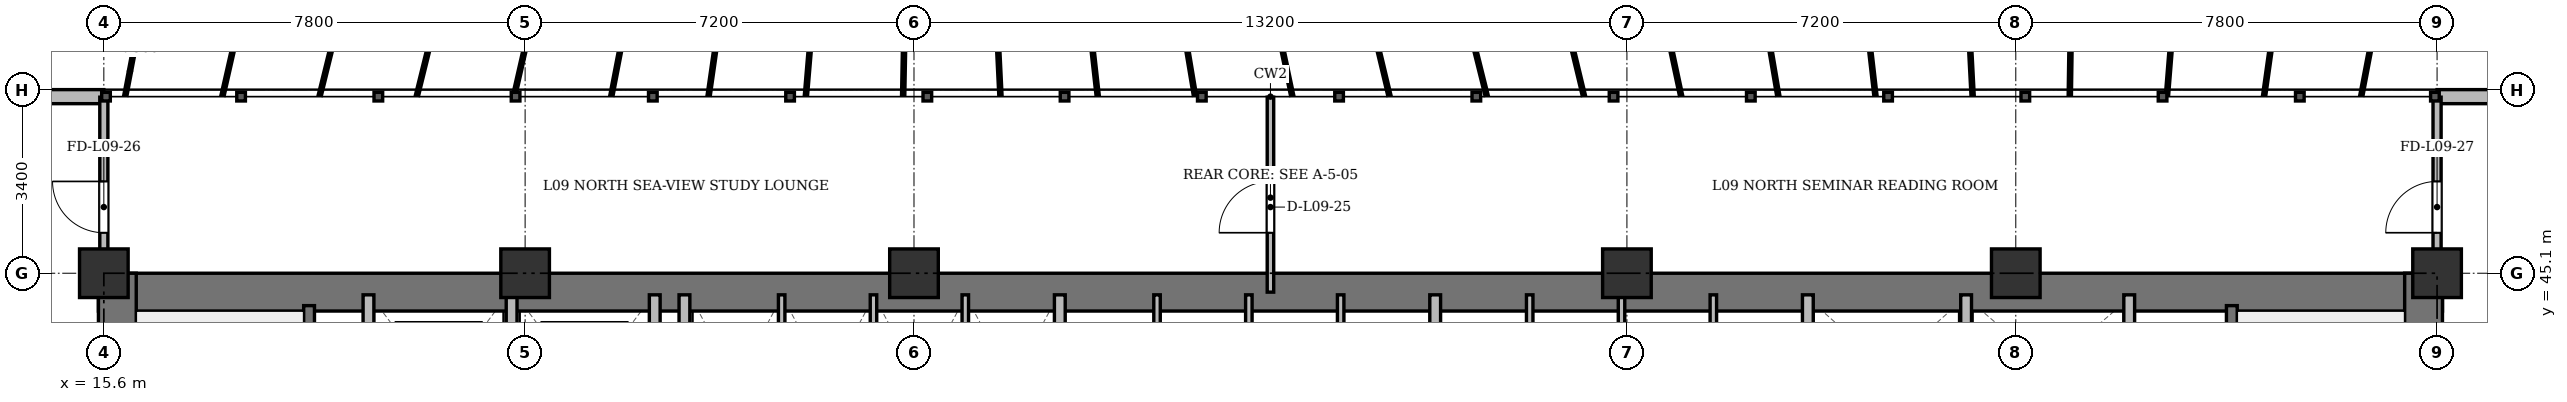
"""IFC4 building model, lengths in metres.
Left out: names, types, materials, properties, quantities, classifications, styles, units other than length and angle.
Written with IfcOpenShell. Run it as: python <this file> out.ifc"""

import sys

from ifc_helpers import new_model, si_unit, direction, frame, frame_2d, origin, origin_2d, place, context, subcontext, project, spatial, rectangle, extrude, source, transform, mapped, element, fill, save


model = new_model("IFC4")
c1 = context("Model", 3, precision=1e-05, world=origin(), true_north=direction((0.0, 1.0)))
c2 = subcontext(c1, "Body", "Model", "MODEL_VIEW")
j1 = project(units=[si_unit("LENGTHUNIT", "METRE"), si_unit("PLANEANGLEUNIT", "RADIAN")], contexts=[c1])
p1 = place(None, origin())
s1 = spatial("IfcSite", under=j1, at=p1, CompositionType="ELEMENT")
p2 = place(p1, origin())
s2 = spatial("IfcBuilding", under=s1, at=p2, CompositionType="ELEMENT")
p3 = place(p2, frame((0.0, 0.0, 37.9)))
s3 = spatial("IfcBuildingStorey", under=s2, at=p3, CompositionType="ELEMENT", Elevation=37.9)
m1 = source(origin(), c2, "Body", "SweptSolid", [
    extrude(rectangle(XDim=0.9, YDim=0.9, at=origin_2d()), origin(), (0.0, 0.0, 1.0), 3.6),
])
for number, where, z_axis, x_axis in (
    (1, (15.6, 45.1, 0.0), (0.0, 0.0, 1.0), (1.0, 0.0, 0.0)),
    (2, (23.4, 45.1, 0.0), (0.0, 0.0, 1.0), (1.0, 0.0, 0.0)),
    (3, (30.6, 45.1, 0.0), (0.0, 0.0, 1.0), (1.0, 0.0, 0.0)),
    (4, (43.8, 45.1, 0.0), (0.0, 0.0, 1.0), (1.0, 0.0, 0.0)),
    (5, (51.0, 45.1, 0.0), (0.0, 0.0, 1.0), (1.0, 0.0, 0.0)),
    (6, (58.8, 45.1, 0.0), (0.0, 0.0, 1.0), (1.0, 0.0, 0.0)),
):
    element("IfcColumn", number, at=place(p3, frame(where, z_axis=z_axis, x_axis=x_axis)), inside=s3, PredefinedType="COLUMN", context=c2, shape_type="MappedRepresentation", body=[
        mapped(m1, transform((0.0, 0.0, 0.0), x_axis=(1.0, 0.0, 0.0), y_axis=(0.0, 1.0, 0.0), z_axis=(0.0, 0.0, 1.0), scale=1.0)),
    ])
p4 = place(p3, frame((7.6, 48.37, 0.0), z_axis=(0.0, 0.0, 1.0), x_axis=(1.0, 0.0, 0.0)))
e7 = element("IfcWall", 7, at=p4, inside=s3, PredefinedType="SOLIDWALL", context=c2, shape_type="SweptSolid", body=[
    extrude(rectangle(XDim=8.0, YDim=0.26, at=frame_2d((4.0, 0.0))), origin(), (0.0, 0.0, 1.0), 3.34),
])
p5 = place(p4, frame((3.325, 0.0, 0.9)))
e8 = element("IfcOpeningElement", 8, at=p5, cuts=e7, PredefinedType="OPENING", context=c2, shape_type="SweptSolid", body=[
    extrude(rectangle(XDim=1.35, YDim=1.5, at=frame_2d((0.675, 0.75))), frame((0.0, 0.14, 0.0), z_axis=(0.0, -1.0, 0.0), x_axis=(1.0, 0.0, 0.0)), (0.0, 0.0, 1.0), 0.28),
])
p6 = place(p3, frame((58.8, 48.37, 0.0), z_axis=(0.0, 0.0, 1.0), x_axis=(1.0, 0.0, 0.0)))
e9 = element("IfcWall", 9, at=p6, inside=s3, PredefinedType="SOLIDWALL", context=c2, shape_type="SweptSolid", body=[
    extrude(rectangle(XDim=8.0, YDim=0.26, at=frame_2d((4.0, 0.0))), origin(), (0.0, 0.0, 1.0), 3.34),
])
p7 = place(p6, frame((3.325, 0.0, 0.9)))
e10 = element("IfcOpeningElement", 10, at=p7, cuts=e9, PredefinedType="OPENING", context=c2, shape_type="SweptSolid", body=[
    extrude(rectangle(XDim=1.35, YDim=1.5, at=frame_2d((0.675, 0.75))), frame((0.0, 0.14, 0.0), z_axis=(0.0, -1.0, 0.0), x_axis=(1.0, 0.0, 0.0)), (0.0, 0.0, 1.0), 0.28),
])
p8 = place(p3, frame((15.5, 44.75, 0.0), z_axis=(0.0, 0.0, 1.0), x_axis=(1.0, 0.0, 0.0)))
e11 = element("IfcWall", 11, at=p8, inside=s3, PredefinedType="SHEAR", context=c2, shape_type="SweptSolid", body=[
    extrude(rectangle(XDim=43.4, YDim=0.7, at=frame_2d((21.7, 0.0))), origin(), (0.0, 0.0, 1.0), 3.34),
])
for number, where, z_axis, x_axis in (
    (12, (15.85, 33.4, 0.0), (0.0, 0.0, 1.0), (0.0, 1.0, 0.0)),
    (13, (58.55, 33.4, 0.0), (0.0, 0.0, 1.0), (0.0, 1.0, 0.0)),
):
    element("IfcWall", number, at=place(p3, frame(where, z_axis=z_axis, x_axis=x_axis)), inside=s3, PredefinedType="SHEAR", context=c2, shape_type="SweptSolid", body=[
        extrude(rectangle(XDim=11.7, YDim=0.7, at=frame_2d((5.85, 0.0))), origin(), (0.0, 0.0, 1.0), 3.34),
    ])
p9 = place(p3, frame((19.4, 33.4, 0.0), z_axis=(0.0, 0.0, 1.0), x_axis=(0.0, 1.0, 0.0)))
e14 = element("IfcWall", 14, at=p9, inside=s3, PredefinedType="SHEAR", context=c2, shape_type="SweptSolid", body=[
    extrude(rectangle(XDim=11.1, YDim=0.2, at=frame_2d((5.55, 0.0))), origin(), (0.0, 0.0, 1.0), 3.34),
])
p10 = place(p9, frame((0.85, 0.0, 0.0)))
e15 = element("IfcOpeningElement", 15, at=p10, cuts=e14, PredefinedType="OPENING", context=c2, shape_type="SweptSolid", body=[
    extrude(rectangle(XDim=1.1, YDim=2.15, at=frame_2d((0.55, 1.075))), frame((0.0, 0.11, 0.0), z_axis=(0.0, -1.0, 0.0), x_axis=(1.0, 0.0, 0.0)), (0.0, 0.0, 1.0), 0.22),
])
p11 = place(p3, frame((55.0, 33.4, 0.0), z_axis=(0.0, 0.0, 1.0), x_axis=(0.0, 1.0, 0.0)))
e16 = element("IfcWall", 16, at=p11, inside=s3, PredefinedType="SHEAR", context=c2, shape_type="SweptSolid", body=[
    extrude(rectangle(XDim=11.1, YDim=0.2, at=frame_2d((5.55, 0.0))), origin(), (0.0, 0.0, 1.0), 3.34),
])
p12 = place(p11, frame((0.85, 0.0, 0.0)))
e17 = element("IfcOpeningElement", 17, at=p12, cuts=e16, PredefinedType="OPENING", context=c2, shape_type="SweptSolid", body=[
    extrude(rectangle(XDim=1.1, YDim=2.15, at=frame_2d((0.55, 1.075))), frame((0.0, 0.11, 0.0), z_axis=(0.0, -1.0, 0.0), x_axis=(1.0, 0.0, 0.0)), (0.0, 0.0, 1.0), 0.22),
])
for number, where, z_axis, x_axis in (
    (18, (20.5, 41.3, 0.0), (0.0, 0.0, 1.0), (0.0, 1.0, 0.0)),
    (19, (23.15, 41.3, 0.0), (0.0, 0.0, 1.0), (0.0, 1.0, 0.0)),
    (20, (25.8, 41.3, 0.0), (0.0, 0.0, 1.0), (0.0, 1.0, 0.0)),
):
    element("IfcWall", number, at=place(p3, frame(where, z_axis=z_axis, x_axis=x_axis)), inside=s3, PredefinedType="SOLIDWALL", context=c2, shape_type="SweptSolid", body=[
        extrude(rectangle(XDim=3.4, YDim=0.2, at=frame_2d((1.7, 0.0))), origin(), (0.0, 0.0, 1.0), 3.34),
    ])
p13 = place(p3, frame((26.35, 33.4, 0.0), z_axis=(0.0, 0.0, 1.0), x_axis=(0.0, 1.0, 0.0)))
e21 = element("IfcWall", 21, at=p13, inside=s3, PredefinedType="SOLIDWALL", context=c2, shape_type="SweptSolid", body=[
    extrude(rectangle(XDim=11.3, YDim=0.2, at=frame_2d((5.65, 0.0))), origin(), (0.0, 0.0, 1.0), 2.69),
])
p14 = place(p3, frame((33.3, 41.5, 0.0), z_axis=(0.0, 0.0, 1.0), x_axis=(0.0, 1.0, 0.0)))
e22 = element("IfcWall", 22, at=p14, inside=s3, PredefinedType="SOLIDWALL", context=c2, shape_type="SweptSolid", body=[
    extrude(rectangle(XDim=3.2, YDim=0.2, at=frame_2d((1.6, 0.0))), origin(), (0.0, 0.0, 1.0), 3.34),
])
for number, where, z_axis, x_axis in (
    (23, (28.15, 41.5, 0.0), (0.0, 0.0, 1.0), (0.0, 1.0, 0.0)),
    (24, (29.85, 41.5, 0.0), (0.0, 0.0, 1.0), (0.0, 1.0, 0.0)),
    (25, (31.55, 41.5, 0.0), (0.0, 0.0, 1.0), (0.0, 1.0, 0.0)),
    (26, (35.1, 41.5, 0.0), (0.0, 0.0, 1.0), (0.0, 1.0, 0.0)),
    (27, (36.8, 41.5, 0.0), (0.0, 0.0, 1.0), (0.0, 1.0, 0.0)),
    (28, (38.5, 41.5, 0.0), (0.0, 0.0, 1.0), (0.0, 1.0, 0.0)),
):
    element("IfcWall", number, at=place(p3, frame(where, z_axis=z_axis, x_axis=x_axis)), inside=s3, PredefinedType="PARTITIONING", context=c2, shape_type="SweptSolid", body=[
        extrude(rectangle(XDim=3.2, YDim=0.12, at=frame_2d((1.6, 0.0))), origin(), (0.0, 0.0, 1.0), 3.34),
    ])
p15 = place(p3, frame((40.25, 41.5, 0.0), z_axis=(0.0, 0.0, 1.0), x_axis=(0.0, 1.0, 0.0)))
e29 = element("IfcWall", 29, at=p15, inside=s3, PredefinedType="SOLIDWALL", context=c2, shape_type="SweptSolid", body=[
    extrude(rectangle(XDim=3.2, YDim=0.2, at=frame_2d((1.6, 0.0))), origin(), (0.0, 0.0, 1.0), 3.34),
])
p16 = place(p3, frame((42.0, 41.5, 0.0), z_axis=(0.0, 0.0, 1.0), x_axis=(0.0, 1.0, 0.0)))
e30 = element("IfcWall", 30, at=p16, inside=s3, PredefinedType="PARTITIONING", context=c2, shape_type="SweptSolid", body=[
    extrude(rectangle(XDim=3.2, YDim=0.12, at=frame_2d((1.6, 0.0))), origin(), (0.0, 0.0, 1.0), 3.34),
])
p17 = place(p3, frame((43.7, 41.5, 0.0), z_axis=(0.0, 0.0, 1.0), x_axis=(0.0, 1.0, 0.0)))
e31 = element("IfcWall", 31, at=p17, inside=s3, PredefinedType="PARTITIONING", context=c2, shape_type="SweptSolid", body=[
    extrude(rectangle(XDim=3.2, YDim=0.12, at=frame_2d((1.6, 0.0))), origin(), (0.0, 0.0, 1.0), 2.752),
])
p18 = place(p3, frame((45.4, 41.5, 0.0), z_axis=(0.0, 0.0, 1.0), x_axis=(0.0, 1.0, 0.0)))
e32 = element("IfcWall", 32, at=p18, inside=s3, PredefinedType="PARTITIONING", context=c2, shape_type="SweptSolid", body=[
    extrude(rectangle(XDim=3.2, YDim=0.12, at=frame_2d((1.6, 0.0))), origin(), (0.0, 0.0, 1.0), 3.34),
])
p19 = place(p3, frame((47.15, 33.4, 0.0), z_axis=(0.0, 0.0, 1.0), x_axis=(0.0, 1.0, 0.0)))
e33 = element("IfcWall", 33, at=p19, inside=s3, PredefinedType="SOLIDWALL", context=c2, shape_type="SweptSolid", body=[
    extrude(rectangle(XDim=11.3, YDim=0.2, at=frame_2d((5.65, 0.0))), origin(), (0.0, 0.0, 1.0), 2.69),
])
for number, where, z_axis, x_axis in (
    (34, (50.08, 42.05, 0.0), (0.0, 0.0, 1.0), (0.0, 1.0, 0.0)),
    (35, (53.1, 42.05, 0.0), (0.0, 0.0, 1.0), (0.0, 1.0, 0.0)),
):
    element("IfcWall", number, at=place(p3, frame(where, z_axis=z_axis, x_axis=x_axis)), inside=s3, PredefinedType="SOLIDWALL", context=c2, shape_type="SweptSolid", body=[
        extrude(rectangle(XDim=2.65, YDim=0.2, at=frame_2d((1.325, 0.0))), origin(), (0.0, 0.0, 1.0), 3.34),
    ])
p20 = place(p3, frame((37.2, 44.75, 0.0), z_axis=(0.0, 0.0, 1.0), x_axis=(0.0, 1.0, 0.0)))
e36 = element("IfcWall", 36, at=p20, inside=s3, PredefinedType="PARTITIONING", context=c2, shape_type="SweptSolid", body=[
    extrude(rectangle(XDim=3.61, YDim=0.12, at=frame_2d((1.805, 0.0))), origin(), (0.0, 0.0, 1.0), 2.69),
])
p21 = place(p20, frame((1.1, 0.0, 0.0)))
e37 = element("IfcOpeningElement", 37, at=p21, cuts=e36, PredefinedType="OPENING", context=c2, shape_type="SweptSolid", body=[
    extrude(rectangle(XDim=0.95, YDim=2.15, at=frame_2d((0.475, 1.075))), frame((0.0, 0.07, 0.0), z_axis=(0.0, -1.0, 0.0), x_axis=(1.0, 0.0, 0.0)), (0.0, 0.0, 1.0), 0.14),
])
p22 = place(p3, frame((15.6, 44.75, 0.0), z_axis=(0.0, 0.0, 1.0), x_axis=(0.0, 1.0, 0.0)))
e38 = element("IfcWall", 38, at=p22, inside=s3, PredefinedType="PARTITIONING", context=c2, shape_type="SweptSolid", body=[
    extrude(rectangle(XDim=3.61, YDim=0.15, at=frame_2d((1.805, 0.0))), origin(), (0.0, 0.0, 1.0), 2.752),
])
p23 = place(p22, frame((1.1, 0.0, 0.0)))
e39 = element("IfcOpeningElement", 39, at=p23, cuts=e38, PredefinedType="OPENING", context=c2, shape_type="SweptSolid", body=[
    extrude(rectangle(XDim=0.95, YDim=2.15, at=frame_2d((0.475, 1.075))), frame((0.0, 0.085, 0.0), z_axis=(0.0, -1.0, 0.0), x_axis=(1.0, 0.0, 0.0)), (0.0, 0.0, 1.0), 0.17),
])
p24 = place(p3, frame((58.8, 44.75, 0.0), z_axis=(0.0, 0.0, 1.0), x_axis=(0.0, 1.0, 0.0)))
e40 = element("IfcWall", 40, at=p24, inside=s3, PredefinedType="PARTITIONING", context=c2, shape_type="SweptSolid", body=[
    extrude(rectangle(XDim=3.61, YDim=0.15, at=frame_2d((1.805, 0.0))), origin(), (0.0, 0.0, 1.0), 2.752),
])
p25 = place(p24, frame((1.1, 0.0, 0.0)))
e41 = element("IfcOpeningElement", 41, at=p25, cuts=e40, PredefinedType="OPENING", context=c2, shape_type="SweptSolid", body=[
    extrude(rectangle(XDim=0.95, YDim=2.15, at=frame_2d((0.475, 1.075))), frame((0.0, 0.085, 0.0), z_axis=(0.0, -1.0, 0.0), x_axis=(1.0, 0.0, 0.0)), (0.0, 0.0, 1.0), 0.17),
])
m2 = source(origin(), c2, "Body", "SweptSolid", [
    extrude(rectangle(XDim=0.95, YDim=2.15, at=frame_2d((0.475, 1.075))), frame((0.0, 0.025, 0.0), z_axis=(0.0, -1.0, 0.0), x_axis=(1.0, 0.0, 0.0)), (0.0, 0.0, 1.0), 0.05),
])
p26 = place(p21, origin())
e42 = element("IfcDoor", 42, at=p26, inside=s3, OperationType="SINGLE_SWING_LEFT", PredefinedType="DOOR", context=c2, shape_type="MappedRepresentation", body=[
    mapped(m2, transform((0.0, 0.0, 0.0), x_axis=(1.0, 0.0, 0.0), y_axis=(0.0, 1.0, 0.0), z_axis=(0.0, 0.0, 1.0), scale=1.0)),
])
fill(e37, e42)
p27 = place(p23, origin())
e43 = element("IfcDoor", 43, at=p27, inside=s3, OperationType="SINGLE_SWING_RIGHT", PredefinedType="DOOR", context=c2, shape_type="MappedRepresentation", body=[
    mapped(m2, transform((0.0, 0.0, 0.0), x_axis=(1.0, 0.0, 0.0), y_axis=(0.0, 1.0, 0.0), z_axis=(0.0, 0.0, 1.0), scale=1.0)),
])
fill(e39, e43)
p28 = place(p25, origin())
e44 = element("IfcDoor", 44, at=p28, inside=s3, OperationType="SINGLE_SWING_LEFT", PredefinedType="DOOR", context=c2, shape_type="MappedRepresentation", body=[
    mapped(m2, transform((0.0, 0.0, 0.0), x_axis=(1.0, 0.0, 0.0), y_axis=(0.0, 1.0, 0.0), z_axis=(0.0, 0.0, 1.0), scale=1.0)),
])
fill(e41, e44)
save(model, sys.argv[1])
